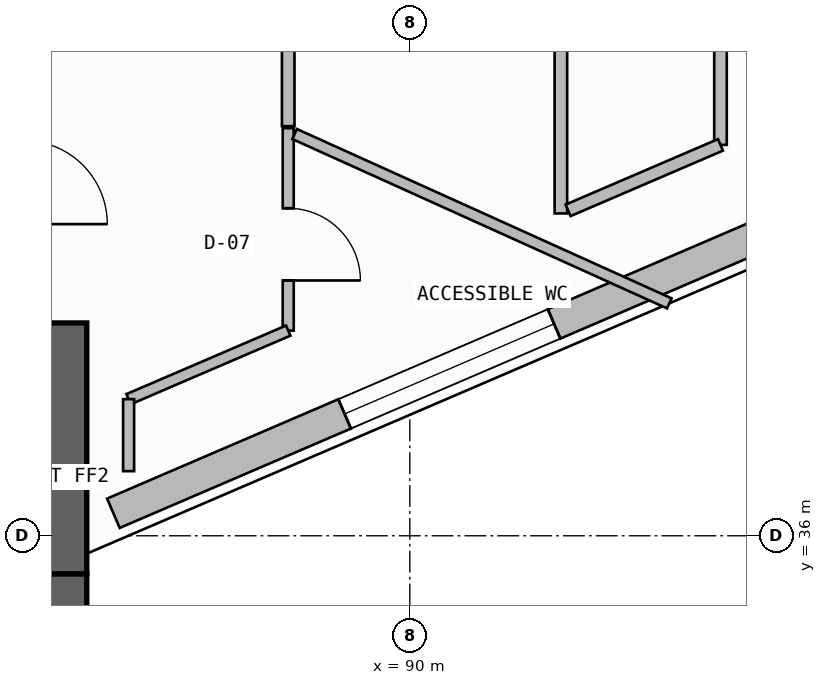
"""IFC4 building model, lengths in metres.
Left out: names, types, materials, properties, quantities, classifications, styles, units other than length and angle.
Written with IfcOpenShell. Run it as: python <this file> out.ifc"""

import sys

from ifc_helpers import new_model, si_unit, direction, frame, frame_2d, origin, place, context, subcontext, project, spatial, rectangle, extrude, element, fill, save


model = new_model("IFC4")
c1 = context("Model", 3, precision=1e-05, world=origin(), true_north=direction((0.0, 1.0)))
c2 = subcontext(c1, "Body", "Model", "MODEL_VIEW")
j1 = project(units=[si_unit("LENGTHUNIT", "METRE"), si_unit("PLANEANGLEUNIT", "RADIAN")], contexts=[c1])
p1 = place(None, origin())
s1 = spatial("IfcSite", under=j1, at=p1, CompositionType="ELEMENT")
p2 = place(p1, origin())
s2 = spatial("IfcBuilding", under=s1, at=p2, CompositionType="ELEMENT")
p3 = place(p2, frame((0.0, 0.0, 193.18)))
s3 = spatial("IfcBuildingStorey", under=s2, at=p3, CompositionType="ELEMENT", Elevation=193.18)
p4 = place(p3, frame((72.15, 35.125, -0.26), z_axis=(0.0, 0.0, 1.0), x_axis=(1.0, 0.0, 0.0)))
e1 = element("IfcWall", 1, at=p4, inside=s3, PredefinedType="SHEAR", context=c2, shape_type="SweptSolid", body=[
    extrude(rectangle(XDim=13.6, YDim=0.75, at=frame_2d((6.8, 0.0))), origin(), (0.0, 0.0, 1.0), 3.28),
])
p5 = place(p3, frame((85.375, 35.5, -0.26), z_axis=(0.0, 0.0, 1.0), x_axis=(0.0, 1.0, 0.0)))
e2 = element("IfcWall", 2, at=p5, inside=s3, PredefinedType="SHEAR", context=c2, shape_type="SweptSolid", body=[
    extrude(rectangle(XDim=3.3, YDim=0.75, at=frame_2d((1.65, 0.0))), origin(), (0.0, 0.0, 1.0), 3.28),
])
p6 = place(p3, frame((86.1, 36.296, 0.0), z_axis=(0.0, 0.0, 1.0), x_axis=(0.918792412723, 0.394741057306, 0.0)))
e3 = element("IfcWall", 3, at=p6, inside=s3, PredefinedType="SOLIDWALL", context=c2, shape_type="SweptSolid", body=[
    extrude(rectangle(XDim=11.794, YDim=0.42, at=frame_2d((5.897, 0.0))), origin(), (0.0, 0.0, 1.0), 2.505),
])
p7 = place(p6, frame((3.311, 0.0, 1.2)))
e4 = element("IfcOpeningElement", 4, at=p7, cuts=e3, PredefinedType="OPENING", context=c2, shape_type="SweptSolid", body=[
    extrude(rectangle(XDim=3.0, YDim=0.9, at=frame_2d((1.5, 0.45))), frame((0.0, 0.22, 0.0), z_axis=(0.0, -1.0, 0.0), x_axis=(1.0, 0.0, 0.0)), (0.0, 0.0, 1.0), 0.44),
])
p8 = place(p3, frame((88.4, 38.699, 0.0), z_axis=(0.0, 0.0, 1.0), x_axis=(0.0, 1.0, 0.0)))
e5 = element("IfcWall", 5, at=p8, inside=s3, PredefinedType="PARTITIONING", context=c2, shape_type="SweptSolid", body=[
    extrude(rectangle(XDim=2.664, YDim=0.145, at=frame_2d((1.332, 0.0))), origin(), (0.0, 0.0, 1.0), 3.02),
])
p9 = place(p8, frame((0.66, 0.0, 0.0)))
e6 = element("IfcOpeningElement", 6, at=p9, cuts=e5, PredefinedType="OPENING", context=c2, shape_type="SweptSolid", body=[
    extrude(rectangle(XDim=0.95, YDim=2.15, at=frame_2d((0.475, 1.075))), frame((0.0, 0.083, 0.0), z_axis=(0.0, -1.0, 0.0), x_axis=(1.0, 0.0, 0.0)), (0.0, 0.0, 1.0), 0.165),
])
p10 = place(p3, frame((86.3, 37.797, 0.0), z_axis=(0.0, 0.0, 1.0), x_axis=(0.918802105609, 0.39471849555, 0.0)))
e7 = element("IfcWall", 7, at=p10, inside=s3, PredefinedType="PARTITIONING", context=c2, shape_type="SweptSolid", body=[
    extrude(rectangle(XDim=2.285, YDim=0.145, at=frame_2d((1.143, 0.0))), origin(), (0.0, 0.0, 1.0), 3.02),
])
p11 = place(p3, frame((88.485, 41.285, 0.0), z_axis=(0.0, 0.0, 1.0), x_axis=(0.911260799287, -0.411829765415, 0.0)))
e8 = element("IfcWall", 8, at=p11, inside=s3, PredefinedType="PARTITIONING", context=c2, shape_type="SweptSolid", body=[
    extrude(rectangle(XDim=5.409, YDim=0.145, at=frame_2d((2.705, 0.0))), origin(), (0.0, 0.0, 1.0), 3.02),
])
p12 = place(p3, frame((91.988, 47.547, 0.0), z_axis=(0.0, 0.0, 1.0), x_axis=(0.0, -1.0, 0.0)))
e9 = element("IfcWall", 9, at=p12, inside=s3, PredefinedType="PARTITIONING", context=c2, shape_type="SweptSolid", body=[
    extrude(rectangle(XDim=7.307, YDim=0.165, at=frame_2d((3.653, 0.0))), origin(), (0.0, 0.0, 1.0), 2.505),
])
p13 = place(p12, frame((3.153, 0.0, 0.0)))
e10 = element("IfcOpeningElement", 10, at=p13, cuts=e9, PredefinedType="OPENING", context=c2, shape_type="SweptSolid", body=[
    extrude(rectangle(XDim=1.0, YDim=2.2, at=frame_2d((0.5, 1.1))), frame((0.0, 0.093, 0.0), z_axis=(0.0, -1.0, 0.0), x_axis=(1.0, 0.0, 0.0)), (0.0, 0.0, 1.0), 0.185),
])
p14 = place(p3, frame((94.087, 41.143, 0.0), z_axis=(0.0, 0.0, 1.0), x_axis=(0.0, 1.0, 0.0)))
e11 = element("IfcWall", 11, at=p14, inside=s3, PredefinedType="PARTITIONING", context=c2, shape_type="SweptSolid", body=[
    extrude(rectangle(XDim=6.716, YDim=0.165, at=frame_2d((3.358, 0.0))), origin(), (0.0, 0.0, 1.0), 2.505),
])
p15 = place(p3, frame((88.4, 41.389, 0.0), z_axis=(0.0, 0.0, 1.0), x_axis=(0.0, 1.0, 0.0)))
e12 = element("IfcWall", 12, at=p15, inside=s3, PredefinedType="PARTITIONING", context=c2, shape_type="SweptSolid", body=[
    extrude(rectangle(XDim=5.625, YDim=0.165, at=frame_2d((2.812, 0.0))), origin(), (0.0, 0.0, 1.0), 2.505),
])
p16 = place(p3, frame((92.082, 40.281, 0.0), z_axis=(0.0, 0.0, 1.0), x_axis=(0.918791733635, 0.394742637935, 0.0)))
e13 = element("IfcWall", 13, at=p16, inside=s3, PredefinedType="PARTITIONING", context=c2, shape_type="SweptSolid", body=[
    extrude(rectangle(XDim=2.183, YDim=0.165, at=frame_2d((1.091, 0.0))), origin(), (0.0, 0.0, 1.0), 3.02),
])
p17 = place(p3, frame((86.3, 36.85, 0.0), z_axis=(0.0, 0.0, 1.0), x_axis=(0.0, 1.0, 0.0)))
e14 = element("IfcWall", 14, at=p17, inside=s3, PredefinedType="PARTITIONING", context=c2, shape_type="SweptSolid", body=[
    extrude(rectangle(XDim=0.947, YDim=0.145, at=frame_2d((0.474, 0.0))), origin(), (0.0, 0.0, 1.0), 3.02),
])
p18 = place(p7, origin())
e15 = element("IfcWindow", 15, at=p18, inside=s3, PartitioningType="SINGLE_PANEL", PredefinedType="WINDOW", context=c2, shape_type="SweptSolid", body=[
    extrude(rectangle(XDim=3.0, YDim=0.9, at=frame_2d((1.5, 0.45))), frame((0.0, 0.03, 0.0), z_axis=(0.0, -1.0, 0.0), x_axis=(1.0, 0.0, 0.0)), (0.0, 0.0, 1.0), 0.06),
])
fill(e4, e15)
p19 = place(p9, frame((0.95, 0.0, 0.0), z_axis=(0.0, 0.0, 1.0), x_axis=(-1.0, 0.0, 0.0)))
e16 = element("IfcDoor", 16, at=p19, inside=s3, OperationType="SINGLE_SWING_RIGHT", PredefinedType="DOOR", context=c2, shape_type="SweptSolid", body=[
    extrude(rectangle(XDim=0.95, YDim=2.15, at=frame_2d((0.475, 1.075))), frame((0.0, 0.025, 0.0), z_axis=(0.0, -1.0, 0.0), x_axis=(1.0, 0.0, 0.0)), (0.0, 0.0, 1.0), 0.05),
])
fill(e6, e16)
save(model, sys.argv[1])
